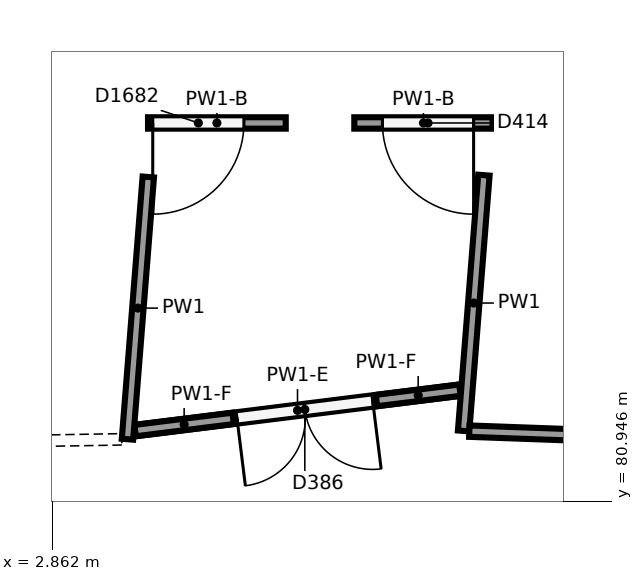
"""IFC4 building model, lengths in metres.
Left out: names, types, materials, properties, quantities, classifications, styles, units other than length and angle.
Written with IfcOpenShell. Run it as: python <this file> out.ifc"""

import sys

from ifc_helpers import new_model, si_unit, direction, frame, frame_2d, origin, origin_2d, place, context, subcontext, project, spatial, rectangle, circle, extrude, element, fill, save


model = new_model("IFC4")
c1 = context("Model", 3, precision=1e-05, world=origin(), true_north=direction((0.0, 1.0)))
c2 = subcontext(c1, "Body", "Model", "MODEL_VIEW")
j1 = project(units=[si_unit("LENGTHUNIT", "METRE"), si_unit("PLANEANGLEUNIT", "RADIAN")], contexts=[c1])
p1 = place(None, origin())
s1 = spatial("IfcSite", under=j1, at=p1, CompositionType="ELEMENT")
p2 = place(p1, origin())
s2 = spatial("IfcBuilding", under=s1, at=p2, CompositionType="ELEMENT")
p3 = place(p2, origin())
s3 = spatial("IfcBuildingStorey", under=s2, at=p3, CompositionType="ELEMENT", Elevation=0.0)
p4 = place(p3, frame((6.387, 85.877, 0.0), z_axis=(0.0, 0.0, 1.0), x_axis=(1.0, 0.0, 0.0)))
e1 = element("IfcColumn", 1, at=p4, inside=s3, PredefinedType="COLUMN", context=c2, shape_type="SweptSolid", body=[
    extrude(circle(Radius=0.4, at=origin_2d()), origin(), (0.0, 0.0, 1.0), 6.5),
])
p5 = place(p3, frame((8.276, 81.873, 0.0), z_axis=(0.0, 0.0, 1.0), x_axis=(0.079118582515, 0.996865211501, 0.0)))
e2 = element("IfcWall", 2, at=p5, inside=s3, PredefinedType="PARTITIONING", context=c2, shape_type="SweptSolid", body=[
    extrude(rectangle(XDim=3.376, YDim=0.15, at=frame_2d((1.688, 0.0))), origin(), (0.0, 0.0, 1.0), 6.15),
])
p6 = place(p3, frame((17.63, 81.533, 0.0), z_axis=(0.0, 0.0, 1.0), x_axis=(-0.999339567389, 0.036337708373, 0.0)))
e3 = element("IfcWall", 3, at=p6, inside=s3, PredefinedType="PARTITIONING", context=c2, shape_type="SweptSolid", body=[
    extrude(rectangle(XDim=9.285, YDim=0.15, at=frame_2d((4.643, 0.0))), origin(), (0.0, 0.0, 1.0), 6.15),
])
p7 = place(p3, frame((4.127, 85.214, 0.0), z_axis=(0.0, 0.0, 1.0), x_axis=(-0.079080692969, -0.99686821797, 0.0)))
e4 = element("IfcWall", 4, at=p7, inside=s3, PredefinedType="PARTITIONING", context=c2, shape_type="SweptSolid", body=[
    extrude(rectangle(XDim=3.461, YDim=0.15, at=frame_2d((1.73, 0.0))), origin(), (0.0, 0.0, 1.0), 6.15),
])
p8 = place(p3, frame((3.778, 81.763, 0.0), z_axis=(0.0, 0.0, 1.0), x_axis=(-0.999845432781, -0.017581539953, 0.0)))
e5 = element("IfcWall", 5, at=p8, inside=s3, PredefinedType="PARTITIONING", context=c2, shape_type="SweptSolid", body=[
    extrude(rectangle(XDim=9.332, YDim=0.15, at=frame_2d((4.666, 0.0))), origin(), (0.0, 0.0, 1.0), 6.15),
])
p9 = place(p8, frame((4.2, 0.0, 0.0)))
e6 = element("IfcOpeningElement", 6, at=p9, cuts=e5, PredefinedType="OPENING", context=c2, shape_type="SweptSolid", body=[
    extrude(rectangle(XDim=1.0, YDim=2.1, at=frame_2d((0.5, 1.05))), frame((0.0, 0.085, 0.0), z_axis=(0.0, -1.0, 0.0), x_axis=(1.0, 0.0, 0.0)), (0.0, 0.0, 1.0), 0.17),
])
p10 = place(p3, frame((8.658, 85.925, 0.0), z_axis=(0.0, 0.0, 1.0), x_axis=(-1.0, 0.0, 0.0)))
e7 = element("IfcWall", 7, at=p10, inside=s3, PredefinedType="PARTITIONING", context=c2, shape_type="SweptSolid", body=[
    extrude(rectangle(XDim=1.82, YDim=0.15, at=frame_2d((0.91, 0.0))), origin(), (0.0, 0.0, 1.0), 4.85),
])
p11 = place(p10, frame((0.25, 0.0, 0.0)))
e8 = element("IfcOpeningElement", 8, at=p11, cuts=e7, PredefinedType="OPENING", context=c2, shape_type="SweptSolid", body=[
    extrude(rectangle(XDim=1.2, YDim=2.1, at=frame_2d((0.6, 1.05))), frame((0.0, 0.085, 0.0), z_axis=(0.0, -1.0, 0.0), x_axis=(1.0, 0.0, 0.0)), (0.0, 0.0, 1.0), 0.17),
])
p12 = place(p3, frame((5.936, 85.925, 0.0), z_axis=(0.0, 0.0, 1.0), x_axis=(-1.0, 0.0, 0.0)))
e9 = element("IfcWall", 9, at=p12, inside=s3, PredefinedType="PARTITIONING", context=c2, shape_type="SweptSolid", body=[
    extrude(rectangle(XDim=1.812, YDim=0.15, at=frame_2d((0.906, 0.0))), origin(), (0.0, 0.0, 1.0), 4.85),
])
p13 = place(p12, frame((0.55, 0.0, 0.0)))
e10 = element("IfcOpeningElement", 10, at=p13, cuts=e9, PredefinedType="OPENING", context=c2, shape_type="SweptSolid", body=[
    extrude(rectangle(XDim=1.2, YDim=2.1, at=frame_2d((0.6, 1.05))), frame((0.0, 0.085, 0.0), z_axis=(0.0, -1.0, 0.0), x_axis=(1.0, 0.0, 0.0)), (0.0, 0.0, 1.0), 0.17),
])
p14 = place(p3, frame((8.227, 82.41, 0.0), z_axis=(0.0, 0.0, 1.0), x_axis=(-0.992346630795, -0.1234834578, 0.0)))
e11 = element("IfcWall", 11, at=p14, inside=s3, PredefinedType="PARTITIONING", context=c2, shape_type="SweptSolid", body=[
    extrude(rectangle(XDim=4.306, YDim=0.15, at=frame_2d((2.153, 0.0))), origin(), (0.0, 0.0, 1.0), 5.25),
])
p15 = place(p14, frame((1.156, 0.0, 0.0)))
e12 = element("IfcOpeningElement", 12, at=p15, cuts=e11, PredefinedType="OPENING", context=c2, shape_type="SweptSolid", body=[
    extrude(rectangle(XDim=1.8, YDim=2.1, at=frame_2d((0.9, 1.05))), frame((0.0, 0.085, 0.0), z_axis=(0.0, -1.0, 0.0), x_axis=(1.0, 0.0, 0.0)), (0.0, 0.0, 1.0), 0.17),
])
p16 = place(p3, frame((5.244, 82.039, 5.25), z_axis=(0.0, 0.0, 1.0), x_axis=(-0.992335553668, -0.123572444041, 0.0)))
e13 = element("IfcWall", 13, at=p16, inside=s3, PredefinedType="PARTITIONING", context=c2, shape_type="SweptSolid", body=[
    extrude(rectangle(XDim=1.3, YDim=0.15, at=frame_2d((0.65, 0.0))), origin(), (0.0, 0.0, 1.0), 0.9),
])
p17 = place(p3, frame((8.227, 82.41, 5.25), z_axis=(0.0, 0.0, 1.0), x_axis=(-0.992359159307, -0.123382733553, 0.0)))
e14 = element("IfcWall", 14, at=p17, inside=s3, PredefinedType="PARTITIONING", context=c2, shape_type="SweptSolid", body=[
    extrude(rectangle(XDim=1.106, YDim=0.15, at=frame_2d((0.553, 0.0))), origin(), (0.0, 0.0, 1.0), 0.9),
])
p18 = place(p11, origin())
e15 = element("IfcDoor", 15, at=p18, inside=s3, OperationType="SINGLE_SWING_LEFT", PredefinedType="DOOR", context=c2, shape_type="SweptSolid", body=[
    extrude(rectangle(XDim=1.2, YDim=2.1, at=frame_2d((0.6, 1.05))), frame((0.0, 0.025, 0.0), z_axis=(0.0, -1.0, 0.0), x_axis=(1.0, 0.0, 0.0)), (0.0, 0.0, 1.0), 0.05),
])
fill(e8, e15)
p19 = place(p13, origin())
e16 = element("IfcDoor", 16, at=p19, inside=s3, OperationType="SINGLE_SWING_RIGHT", PredefinedType="DOOR", context=c2, shape_type="SweptSolid", body=[
    extrude(rectangle(XDim=1.2, YDim=2.1, at=frame_2d((0.6, 1.05))), frame((0.0, 0.025, 0.0), z_axis=(0.0, -1.0, 0.0), x_axis=(1.0, 0.0, 0.0)), (0.0, 0.0, 1.0), 0.05),
])
fill(e10, e16)
p20 = place(p15, origin())
e17 = element("IfcDoor", 17, at=p20, inside=s3, OperationType="DOUBLE_DOOR_SINGLE_SWING", PredefinedType="DOOR", context=c2, shape_type="SweptSolid", body=[
    extrude(rectangle(XDim=1.8, YDim=2.1, at=frame_2d((0.9, 1.05))), frame((0.0, 0.025, 0.0), z_axis=(0.0, -1.0, 0.0), x_axis=(1.0, 0.0, 0.0)), (0.0, 0.0, 1.0), 0.05),
])
fill(e12, e17)
save(model, sys.argv[1])
